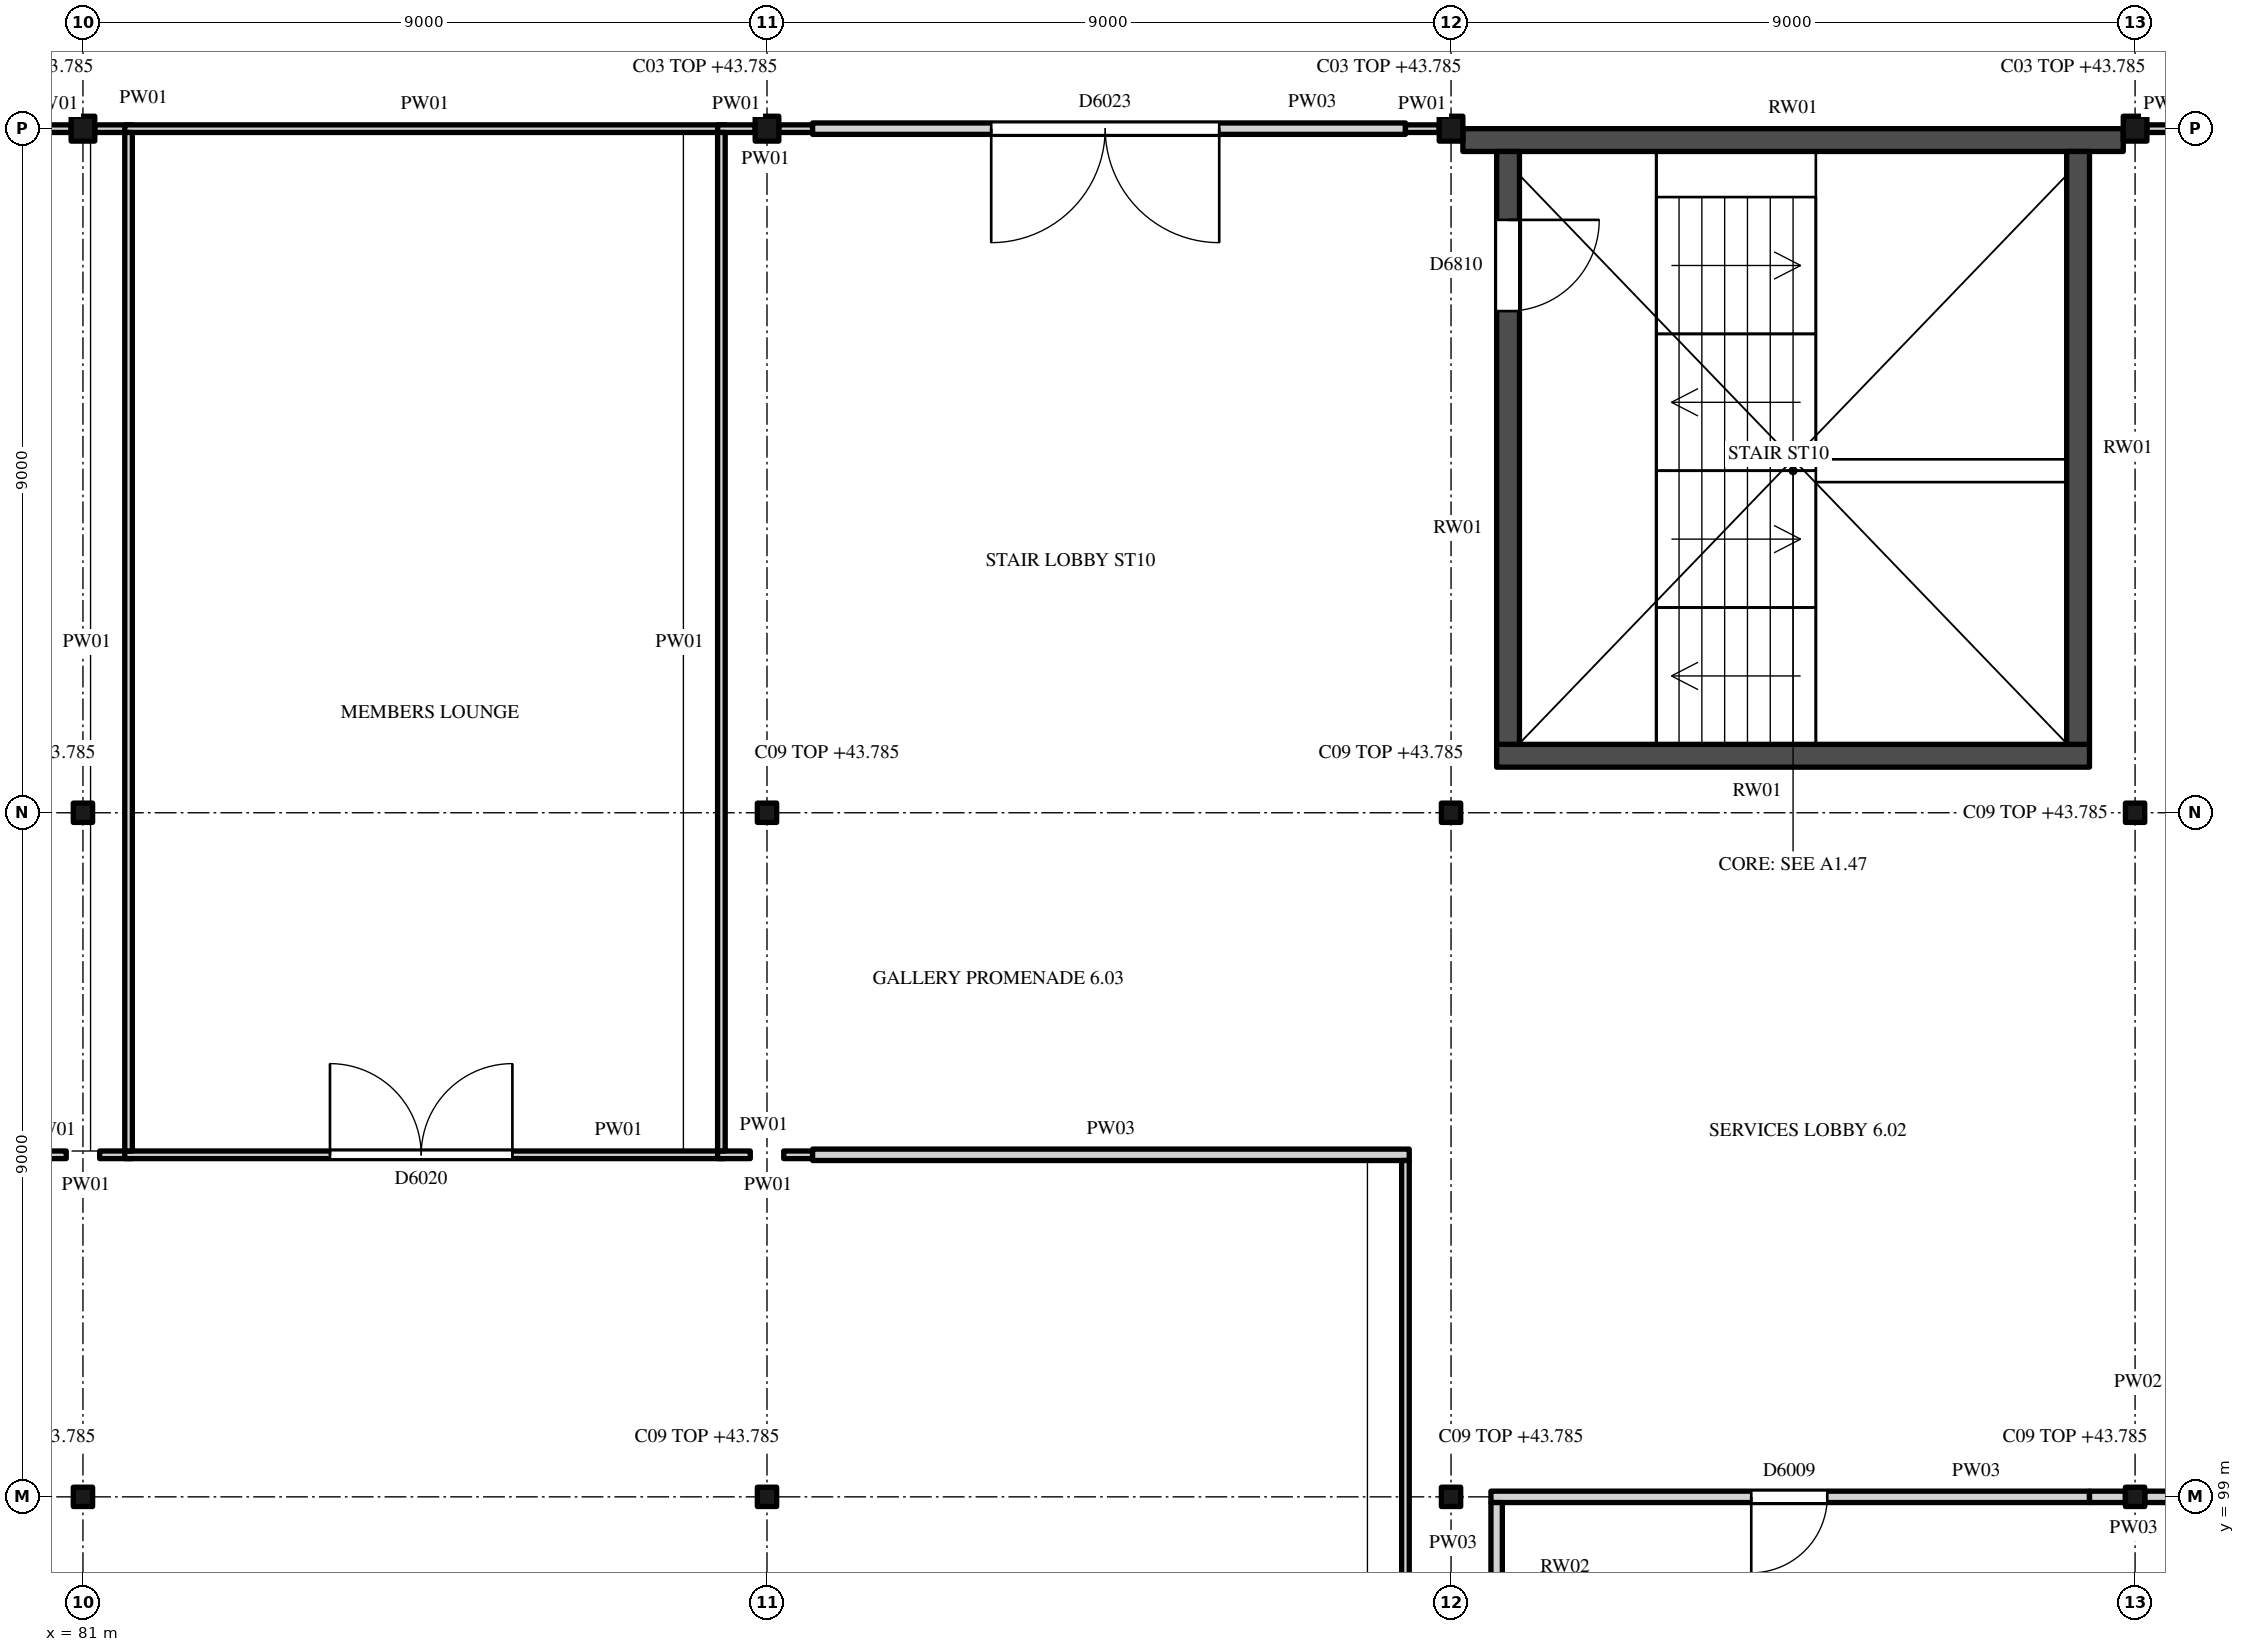
"""IFC4 building model, lengths in metres.
Left out: names, types, materials, properties, quantities, classifications, styles, units other than length and angle.
Written with IfcOpenShell. Run it as: python <this file> out.ifc"""

import sys

from ifc_helpers import new_model, si_unit, direction, frame, frame_2d, origin, origin_2d, place, context, subcontext, project, spatial, polyline, rectangle, i_section, outline, extrude, element, fill, save


model = new_model("IFC4")
c1 = context("Model", 3, precision=1e-05, world=origin(), true_north=direction((0.0, 1.0)))
c2 = subcontext(c1, "Body", "Model", "MODEL_VIEW")
j1 = project(units=[si_unit("LENGTHUNIT", "METRE"), si_unit("PLANEANGLEUNIT", "RADIAN")], contexts=[c1])
p1 = place(None, origin())
s1 = spatial("IfcSite", under=j1, at=p1, CompositionType="ELEMENT")
p2 = place(p1, origin())
s2 = spatial("IfcBuilding", under=s1, at=p2, CompositionType="ELEMENT")
p3 = place(p2, frame((0.0, 0.0, 36.0)))
s3 = spatial("IfcBuildingStorey", under=s2, at=p3, CompositionType="ELEMENT", Elevation=36.0)
for number, where, z_axis, x_axis in (
    (1, (81.0, 99.0, 0.0), (0.0, 0.0, 1.0), (1.0, 0.0, 0.0)),
    (2, (90.0, 99.0, 0.0), (0.0, 0.0, 1.0), (1.0, 0.0, 0.0)),
    (3, (99.0, 99.0, 0.0), (0.0, 0.0, 1.0), (1.0, 0.0, 0.0)),
    (4, (108.0, 99.0, 0.0), (0.0, 0.0, 1.0), (1.0, 0.0, 0.0)),
    (5, (81.0, 108.0, 0.0), (0.0, 0.0, 1.0), (1.0, 0.0, 0.0)),
    (6, (90.0, 108.0, 0.0), (0.0, 0.0, 1.0), (1.0, 0.0, 0.0)),
    (7, (99.0, 108.0, 0.0), (0.0, 0.0, 1.0), (1.0, 0.0, 0.0)),
    (8, (108.0, 108.0, 0.0), (0.0, 0.0, 1.0), (1.0, 0.0, 0.0)),
):
    element("IfcColumn", number, at=place(p3, frame(where, z_axis=z_axis, x_axis=x_axis)), inside=s3, PredefinedType="COLUMN", context=c2, shape_type="SweptSolid", body=[
        extrude(i_section(OverallWidth=0.254, OverallDepth=0.254, WebThickness=0.009, FlangeThickness=0.014, FilletRadius=0.014, at=origin_2d()), origin(), (0.0, 0.0, 1.0), 7.785),
    ])
for number, where, z_axis, x_axis in (
    (9, (81.0, 117.0, 0.0), (0.0, 0.0, 1.0), (1.0, 0.0, 0.0)),
    (10, (90.0, 117.0, 0.0), (0.0, 0.0, 1.0), (1.0, 0.0, 0.0)),
    (11, (99.0, 117.0, 0.0), (0.0, 0.0, 1.0), (1.0, 0.0, 0.0)),
    (12, (108.0, 117.0, 0.0), (0.0, 0.0, 1.0), (1.0, 0.0, 0.0)),
):
    element("IfcColumn", number, at=place(p3, frame(where, z_axis=z_axis, x_axis=x_axis)), inside=s3, PredefinedType="COLUMN", context=c2, shape_type="SweptSolid", body=[
        extrude(i_section(OverallWidth=0.311, OverallDepth=0.327, WebThickness=0.016, FlangeThickness=0.025, FilletRadius=0.017, at=origin_2d()), origin(), (0.0, 0.0, 1.0), 7.785),
    ])
p4 = place(p3, frame((99.6, 108.75, 0.0), z_axis=(0.0, 0.0, 1.0), x_axis=(1.0, 0.0, 0.0)))
e13 = element("IfcWall", 13, at=p4, inside=s3, PredefinedType="SHEAR", context=c2, shape_type="SweptSolid", body=[
    extrude(outline(polyline([(0.0, 0.0), (7.8, 0.0), (7.8, 8.27), (7.548, 8.496), (7.297, 8.708), (6.542, 9.143), (6.29, 9.291), (5.284, 9.617), (5.032, 9.68), (4.026, 9.786), (3.774, 9.786), (2.768, 9.68), (2.516, 9.617), (1.51, 9.291), (1.258, 9.143), (0.503, 8.708), (0.252, 8.496), (0.0, 8.27), (0.0, 0.0)])), frame((0.0, 0.15, 0.0), z_axis=(0.0, -1.0, 0.0), x_axis=(1.0, 0.0, 0.0)), (0.0, 0.0, 1.0), 0.3),
])
p5 = place(p3, frame((99.156, 116.85, 0.0), z_axis=(0.0, 0.0, 1.0), x_axis=(1.0, 0.0, 0.0)))
e14 = element("IfcWall", 14, at=p5, inside=s3, PredefinedType="SHEAR", context=c2, shape_type="SweptSolid", body=[
    extrude(outline(polyline([(0.0, 0.0), (8.689, 0.0), (8.689, 7.871), (7.922, 8.56), (7.667, 8.751), (6.9, 9.193), (6.645, 9.32), (5.622, 9.651), (5.367, 9.692), (4.344, 9.799), (3.322, 9.692), (3.067, 9.651), (2.044, 9.32), (1.789, 9.193), (1.022, 8.751), (0.767, 8.56), (0.0, 7.871), (0.0, 0.0)])), frame((0.0, 0.15, 0.0), z_axis=(0.0, -1.0, 0.0), x_axis=(1.0, 0.0, 0.0)), (0.0, 0.0, 1.0), 0.3),
])
p6 = place(p3, frame((99.75, 108.9, 0.0), z_axis=(0.0, 0.0, 1.0), x_axis=(0.0, 1.0, 0.0)))
e15 = element("IfcWall", 15, at=p6, inside=s3, PredefinedType="SHEAR", context=c2, shape_type="SweptSolid", body=[
    extrude(rectangle(XDim=7.8, YDim=0.3, at=frame_2d((3.9, 0.0))), origin(), (0.0, 0.0, 1.0), 8.405),
])
p7 = place(p6, frame((5.7, 0.0, 0.0)))
e16 = element("IfcOpeningElement", 16, at=p7, cuts=e15, PredefinedType="OPENING", context=c2, shape_type="SweptSolid", body=[
    extrude(rectangle(XDim=1.2, YDim=2.1, at=frame_2d((0.6, 1.05))), frame((0.0, 0.16, 0.0), z_axis=(0.0, -1.0, 0.0), x_axis=(1.0, 0.0, 0.0)), (0.0, 0.0, 1.0), 0.32),
])
p8 = place(p3, frame((107.25, 108.9, 0.0), z_axis=(0.0, 0.0, 1.0), x_axis=(0.0, 1.0, 0.0)))
e17 = element("IfcWall", 17, at=p8, inside=s3, PredefinedType="SHEAR", context=c2, shape_type="SweptSolid", body=[
    extrude(rectangle(XDim=7.8, YDim=0.3, at=frame_2d((3.9, 0.0))), origin(), (0.0, 0.0, 1.0), 8.405),
])
p9 = place(p3, frame((99.525, 99.0, 0.0), z_axis=(0.0, 0.0, 1.0), x_axis=(1.0, 0.0, 0.0)))
e18 = element("IfcWall", 18, at=p9, inside=s3, PredefinedType="PARTITIONING", context=c2, shape_type="SweptSolid", body=[
    extrude(rectangle(XDim=7.875, YDim=0.15, at=frame_2d((3.938, 0.0))), origin(), (0.0, 0.0, 1.0), 7.731),
])
p10 = place(p9, frame((3.425, 0.0, 0.0)))
e19 = element("IfcOpeningElement", 19, at=p10, cuts=e18, PredefinedType="OPENING", context=c2, shape_type="SweptSolid", body=[
    extrude(rectangle(XDim=1.0, YDim=2.4, at=frame_2d((0.5, 1.2))), frame((0.0, 0.085, 0.0), z_axis=(0.0, -1.0, 0.0), x_axis=(1.0, 0.0, 0.0)), (0.0, 0.0, 1.0), 0.17),
])
p11 = place(p3, frame((107.4, 99.0, 0.0), z_axis=(0.0, 0.0, 1.0), x_axis=(1.0, 0.0, 0.0)))
e20 = element("IfcWall", 20, at=p11, inside=s3, PredefinedType="PARTITIONING", context=c2, shape_type="SweptSolid", body=[
    extrude(rectangle(XDim=0.473, YDim=0.15, at=frame_2d((0.236, 0.0))), origin(), (0.0, 0.0, 1.0), 7.731),
])
p12 = place(p3, frame((108.127, 99.0, 0.0), z_axis=(0.0, 0.0, 1.0), x_axis=(1.0, 0.0, 0.0)))
e21 = element("IfcWall", 21, at=p12, inside=s3, PredefinedType="PARTITIONING", context=c2, shape_type="SweptSolid", body=[
    extrude(rectangle(XDim=0.535, YDim=0.15, at=frame_2d((0.268, 0.0))), origin(), (0.0, 0.0, 1.0), 7.731),
])
p13 = place(p3, frame((80.4, 103.5, 0.0), z_axis=(0.0, 0.0, 1.0), x_axis=(1.0, 0.0, 0.0)))
e22 = element("IfcWall", 22, at=p13, inside=s3, PredefinedType="PARTITIONING", context=c2, shape_type="SweptSolid", body=[
    extrude(rectangle(XDim=0.38, YDim=0.1, at=frame_2d((0.19, 0.0))), origin(), (0.0, 0.0, 1.0), 7.731),
])
p14 = place(p3, frame((81.22, 103.5, 0.0), z_axis=(0.0, 0.0, 1.0), x_axis=(1.0, 0.0, 0.0)))
e23 = element("IfcWall", 23, at=p14, inside=s3, PredefinedType="PARTITIONING", context=c2, shape_type="SweptSolid", body=[
    extrude(rectangle(XDim=0.429, YDim=0.1, at=frame_2d((0.215, 0.0))), origin(), (0.0, 0.0, 1.0), 7.731),
])
p15 = place(p3, frame((81.55, 103.5, 0.0), z_axis=(0.0, 0.0, 1.0), x_axis=(1.0, 0.0, 0.0)))
e24 = element("IfcWall", 24, at=p15, inside=s3, PredefinedType="PARTITIONING", context=c2, shape_type="SweptSolid", body=[
    extrude(rectangle(XDim=7.9, YDim=0.1, at=frame_2d((3.95, 0.0))), origin(), (0.0, 0.0, 1.0), 7.731),
])
p16 = place(p15, frame((2.7, 0.0, 0.0)))
e25 = element("IfcOpeningElement", 25, at=p16, cuts=e24, PredefinedType="OPENING", context=c2, shape_type="SweptSolid", body=[
    extrude(rectangle(XDim=2.4, YDim=2.4, at=frame_2d((1.2, 1.2))), frame((0.0, 0.06, 0.0), z_axis=(0.0, -1.0, 0.0), x_axis=(1.0, 0.0, 0.0)), (0.0, 0.0, 1.0), 0.12),
])
p17 = place(p3, frame((89.351, 103.5, 0.0), z_axis=(0.0, 0.0, 1.0), x_axis=(1.0, 0.0, 0.0)))
e26 = element("IfcWall", 26, at=p17, inside=s3, PredefinedType="PARTITIONING", context=c2, shape_type="SweptSolid", body=[
    extrude(rectangle(XDim=0.429, YDim=0.1, at=frame_2d((0.215, 0.0))), origin(), (0.0, 0.0, 1.0), 7.731),
])
p18 = place(p3, frame((90.22, 103.5, 0.0), z_axis=(0.0, 0.0, 1.0), x_axis=(1.0, 0.0, 0.0)))
e27 = element("IfcWall", 27, at=p18, inside=s3, PredefinedType="PARTITIONING", context=c2, shape_type="SweptSolid", body=[
    extrude(rectangle(XDim=0.38, YDim=0.1, at=frame_2d((0.19, 0.0))), origin(), (0.0, 0.0, 1.0), 7.731),
])
p19 = place(p3, frame((90.6, 103.5, 0.0), z_axis=(0.0, 0.0, 1.0), x_axis=(1.0, 0.0, 0.0)))
e28 = element("IfcWall", 28, at=p19, inside=s3, PredefinedType="PARTITIONING", context=c2, shape_type="SweptSolid", body=[
    extrude(rectangle(XDim=7.85, YDim=0.15, at=frame_2d((3.925, 0.0))), origin(), (0.0, 0.0, 1.0), 7.731),
])
p20 = place(p3, frame((80.4, 117.0, 0.0), z_axis=(0.0, 0.0, 1.0), x_axis=(1.0, 0.0, 0.0)))
e29 = element("IfcWall", 29, at=p20, inside=s3, PredefinedType="PARTITIONING", context=c2, shape_type="SweptSolid", body=[
    extrude(rectangle(XDim=0.444, YDim=0.1, at=frame_2d((0.222, 0.0))), origin(), (0.0, 0.0, 1.0), 7.731),
])
p21 = place(p3, frame((81.156, 117.0, 0.0), z_axis=(0.0, 0.0, 1.0), x_axis=(1.0, 0.0, 0.0)))
e30 = element("IfcWall", 30, at=p21, inside=s3, PredefinedType="PARTITIONING", context=c2, shape_type="SweptSolid", body=[
    extrude(rectangle(XDim=0.494, YDim=0.1, at=frame_2d((0.247, 0.0))), origin(), (0.0, 0.0, 1.0), 7.731),
])
p22 = place(p3, frame((81.55, 117.0, 0.0), z_axis=(0.0, 0.0, 1.0), x_axis=(1.0, 0.0, 0.0)))
e31 = element("IfcWall", 31, at=p22, inside=s3, PredefinedType="PARTITIONING", context=c2, shape_type="SweptSolid", body=[
    extrude(rectangle(XDim=7.9, YDim=0.1, at=frame_2d((3.95, 0.0))), origin(), (0.0, 0.0, 1.0), 7.731),
])
p23 = place(p3, frame((89.351, 117.0, 0.0), z_axis=(0.0, 0.0, 1.0), x_axis=(1.0, 0.0, 0.0)))
e32 = element("IfcWall", 32, at=p23, inside=s3, PredefinedType="PARTITIONING", context=c2, shape_type="SweptSolid", body=[
    extrude(rectangle(XDim=0.494, YDim=0.1, at=frame_2d((0.247, 0.0))), origin(), (0.0, 0.0, 1.0), 7.731),
])
p24 = place(p3, frame((90.156, 117.0, 0.0), z_axis=(0.0, 0.0, 1.0), x_axis=(1.0, 0.0, 0.0)))
e33 = element("IfcWall", 33, at=p24, inside=s3, PredefinedType="PARTITIONING", context=c2, shape_type="SweptSolid", body=[
    extrude(rectangle(XDim=0.444, YDim=0.1, at=frame_2d((0.222, 0.0))), origin(), (0.0, 0.0, 1.0), 7.731),
])
p25 = place(p3, frame((90.6, 117.0, 0.0), z_axis=(0.0, 0.0, 1.0), x_axis=(1.0, 0.0, 0.0)))
e34 = element("IfcWall", 34, at=p25, inside=s3, PredefinedType="PARTITIONING", context=c2, shape_type="SweptSolid", body=[
    extrude(rectangle(XDim=7.8, YDim=0.15, at=frame_2d((3.9, 0.0))), origin(), (0.0, 0.0, 1.0), 7.731),
])
p26 = place(p25, frame((2.35, 0.0, 0.0)))
e35 = element("IfcOpeningElement", 35, at=p26, cuts=e34, PredefinedType="OPENING", context=c2, shape_type="SweptSolid", body=[
    extrude(rectangle(XDim=3.0, YDim=3.0, at=frame_2d((1.5, 1.5))), frame((0.0, 0.085, 0.0), z_axis=(0.0, -1.0, 0.0), x_axis=(1.0, 0.0, 0.0)), (0.0, 0.0, 1.0), 0.17),
])
p27 = place(p3, frame((98.4, 117.0, 0.0), z_axis=(0.0, 0.0, 1.0), x_axis=(1.0, 0.0, 0.0)))
e36 = element("IfcWall", 36, at=p27, inside=s3, PredefinedType="PARTITIONING", context=c2, shape_type="SweptSolid", body=[
    extrude(rectangle(XDim=0.444, YDim=0.1, at=frame_2d((0.222, 0.0))), origin(), (0.0, 0.0, 1.0), 7.731),
])
p28 = place(p3, frame((108.156, 117.0, 0.0), z_axis=(0.0, 0.0, 1.0), x_axis=(1.0, 0.0, 0.0)))
e37 = element("IfcWall", 37, at=p28, inside=s3, PredefinedType="PARTITIONING", context=c2, shape_type="SweptSolid", body=[
    extrude(rectangle(XDim=0.544, YDim=0.1, at=frame_2d((0.272, 0.0))), origin(), (0.0, 0.0, 1.0), 7.731),
])
for number, where, z_axis, x_axis in (
    (38, (81.6, 103.55, 0.0), (0.0, 0.0, 1.0), (0.0, 1.0, 0.0)),
    (39, (89.4, 103.55, 0.0), (0.0, 0.0, 1.0), (0.0, 1.0, 0.0)),
):
    element("IfcWall", number, at=place(p3, frame(where, z_axis=z_axis, x_axis=x_axis)), inside=s3, PredefinedType="PARTITIONING", context=c2, shape_type="SweptSolid", body=[
        extrude(rectangle(XDim=13.4, YDim=0.1, at=frame_2d((6.7, 0.0))), origin(), (0.0, 0.0, 1.0), 7.731),
    ])
p29 = place(p3, frame((98.4, 90.675, 0.0), z_axis=(0.0, 0.0, 1.0), x_axis=(0.0, 1.0, 0.0)))
e40 = element("IfcWall", 40, at=p29, inside=s3, PredefinedType="PARTITIONING", context=c2, shape_type="SweptSolid", body=[
    extrude(rectangle(XDim=12.75, YDim=0.1, at=frame_2d((6.375, 0.0))), origin(), (0.0, 0.0, 1.0), 7.731),
])
p30 = place(p3, frame((99.6, 97.85, 0.0), z_axis=(0.0, 0.0, 1.0), x_axis=(0.0, 1.0, 0.0)))
e41 = element("IfcWall", 41, at=p30, inside=s3, PredefinedType="PARTITIONING", context=c2, shape_type="SweptSolid", body=[
    extrude(rectangle(XDim=1.075, YDim=0.15, at=frame_2d((0.538, 0.0))), origin(), (0.0, 0.0, 1.0), 7.731),
])
p31 = place(p7, origin())
e42 = element("IfcDoor", 42, at=p31, inside=s3, OperationType="SINGLE_SWING_RIGHT", PredefinedType="DOOR", context=c2, shape_type="SweptSolid", body=[
    extrude(rectangle(XDim=1.2, YDim=2.1, at=frame_2d((0.6, 1.05))), frame((0.0, 0.025, 0.0), z_axis=(0.0, -1.0, 0.0), x_axis=(1.0, 0.0, 0.0)), (0.0, 0.0, 1.0), 0.05),
])
fill(e16, e42)
p32 = place(p10, origin())
e43 = element("IfcDoor", 43, at=p32, inside=s3, OperationType="SINGLE_SWING_LEFT", PredefinedType="DOOR", context=c2, shape_type="SweptSolid", body=[
    extrude(rectangle(XDim=1.0, YDim=2.4, at=frame_2d((0.5, 1.2))), frame((0.0, 0.025, 0.0), z_axis=(0.0, -1.0, 0.0), x_axis=(1.0, 0.0, 0.0)), (0.0, 0.0, 1.0), 0.05),
])
fill(e19, e43)
p33 = place(p16, origin())
e44 = element("IfcDoor", 44, at=p33, inside=s3, OperationType="DOUBLE_DOOR_SINGLE_SWING", PredefinedType="DOOR", context=c2, shape_type="SweptSolid", body=[
    extrude(rectangle(XDim=2.4, YDim=2.4, at=frame_2d((1.2, 1.2))), frame((0.0, 0.025, 0.0), z_axis=(0.0, -1.0, 0.0), x_axis=(1.0, 0.0, 0.0)), (0.0, 0.0, 1.0), 0.05),
])
fill(e25, e44)
p34 = place(p26, origin())
e45 = element("IfcDoor", 45, at=p34, inside=s3, OperationType="DOUBLE_DOOR_SINGLE_SWING", PredefinedType="DOOR", context=c2, shape_type="SweptSolid", body=[
    extrude(rectangle(XDim=3.0, YDim=3.0, at=frame_2d((1.5, 1.5))), frame((0.0, 0.025, 0.0), z_axis=(0.0, -1.0, 0.0), x_axis=(1.0, 0.0, 0.0)), (0.0, 0.0, 1.0), 0.05),
])
fill(e35, e45)
save(model, sys.argv[1])
